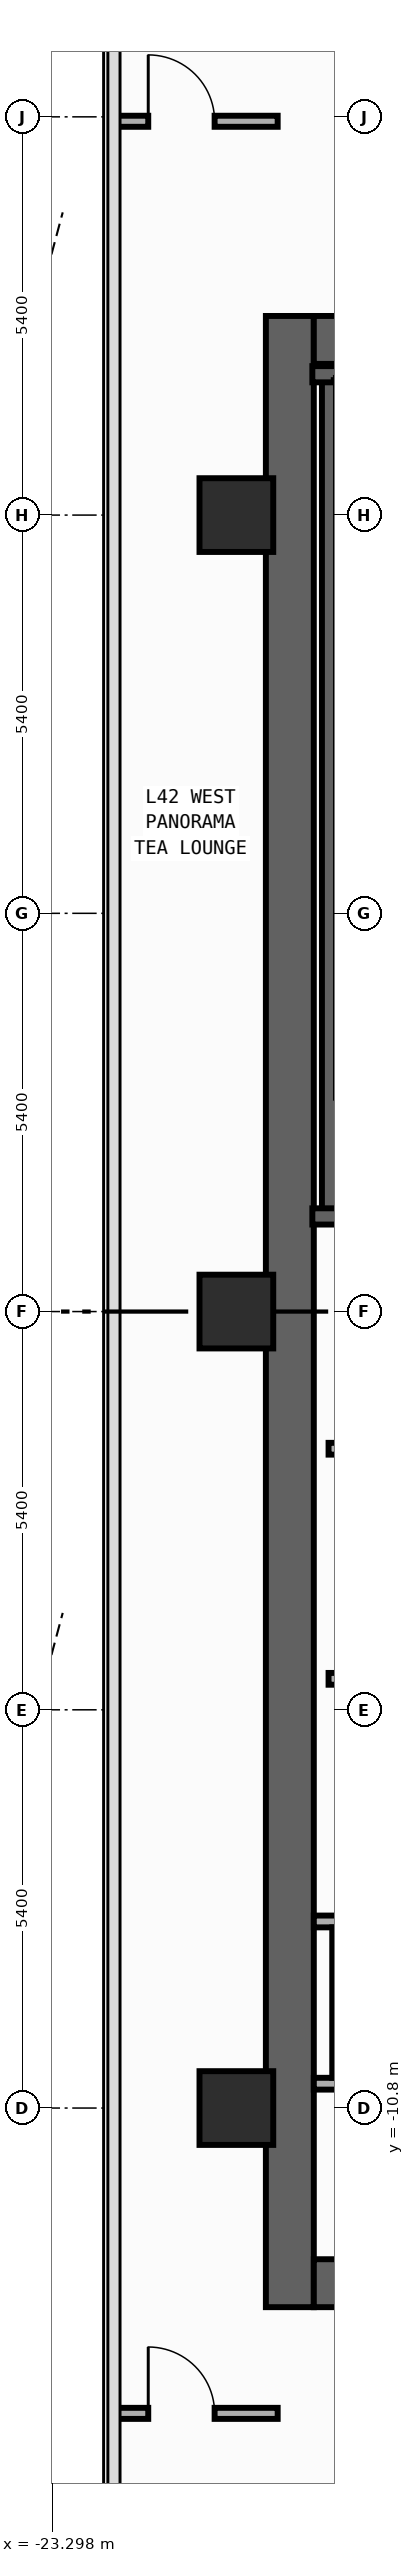
"""IFC4 building model, lengths in metres.
Left out: names, types, materials, properties, quantities, classifications, styles, units other than length and angle.
Written with IfcOpenShell. Run it as: python <this file> out.ifc"""

import sys

from ifc_helpers import new_model, si_unit, direction, frame, frame_2d, origin, origin_2d, place, context, subcontext, project, spatial, rectangle, extrude, element, fill, save


model = new_model("IFC4")
c1 = context("Model", 3, precision=1e-05, world=origin(), true_north=direction((0.0, 1.0)))
c2 = subcontext(c1, "Body", "Model", "MODEL_VIEW")
j1 = project(units=[si_unit("LENGTHUNIT", "METRE"), si_unit("PLANEANGLEUNIT", "RADIAN")], contexts=[c1])
p1 = place(None, origin())
s1 = spatial("IfcSite", under=j1, at=p1, CompositionType="ELEMENT")
p2 = place(p1, origin())
s2 = spatial("IfcBuilding", under=s1, at=p2, CompositionType="ELEMENT")
p3 = place(p2, frame((0.0, 0.0, 184.0)))
s3 = spatial("IfcBuildingStorey", under=s2, at=p3, CompositionType="ELEMENT", Elevation=184.0)
p4 = place(p3, frame((-20.075, -13.5, 0.0), z_axis=(0.0, 0.0, 1.0), x_axis=(0.0, 1.0, 0.0)))
e1 = element("IfcWall", 1, at=p4, inside=s3, PredefinedType="SHEAR", context=c2, shape_type="SweptSolid", body=[
    extrude(rectangle(XDim=27.0, YDim=0.65, at=frame_2d((13.5, 0.0))), origin(), (0.0, 0.0, 1.0), 3.54),
])
for number, where, z_axis, x_axis in (
    (2, (-19.75, -13.175, 0.0), (0.0, 0.0, 1.0), (1.0, 0.0, 0.0)),
    (3, (-19.75, 13.175, 0.0), (0.0, 0.0, 1.0), (1.0, 0.0, 0.0)),
):
    element("IfcWall", number, at=place(p3, frame(where, z_axis=z_axis, x_axis=x_axis)), inside=s3, PredefinedType="SHEAR", context=c2, shape_type="SweptSolid", body=[
        extrude(rectangle(XDim=7.1, YDim=0.65, at=frame_2d((3.55, 0.0))), origin(), (0.0, 0.0, 1.0), 3.54),
    ])
p5 = place(p3, frame((-19.53, 1.29, 0.0), z_axis=(0.0, 0.0, 1.0), x_axis=(0.0, 1.0, 0.0)))
e4 = element("IfcWall", 4, at=p5, inside=s3, PredefinedType="SHEAR", context=c2, shape_type="SweptSolid", body=[
    extrude(rectangle(XDim=11.42, YDim=0.22, at=frame_2d((5.71, 0.0))), origin(), (0.0, 0.0, 1.0), 3.54),
])
p6 = place(p3, frame((-19.77, 12.71, 0.0), z_axis=(0.0, 0.0, 1.0), x_axis=(1.0, 0.0, 0.0)))
e5 = element("IfcWall", 5, at=p6, inside=s3, PredefinedType="SHEAR", context=c2, shape_type="SweptSolid", body=[
    extrude(rectangle(XDim=4.065, YDim=0.22, at=frame_2d((2.032, 0.0))), origin(), (0.0, 0.0, 1.0), 3.54),
])
p7 = place(p3, frame((-19.77, 1.29, 0.0), z_axis=(0.0, 0.0, 1.0), x_axis=(1.0, 0.0, 0.0)))
e6 = element("IfcWall", 6, at=p7, inside=s3, PredefinedType="SHEAR", context=c2, shape_type="SweptSolid", body=[
    extrude(rectangle(XDim=4.065, YDim=0.22, at=frame_2d((2.032, 0.0))), origin(), (0.0, 0.0, 1.0), 3.54),
])
p8 = place(p7, frame((1.08, 0.0, 0.0)))
e7 = element("IfcOpeningElement", 7, at=p8, cuts=e6, PredefinedType="OPENING", context=c2, shape_type="SweptSolid", body=[
    extrude(rectangle(XDim=1.1, YDim=2.2, at=frame_2d((0.55, 1.1))), frame((0.0, 0.12, 0.0), z_axis=(0.0, -1.0, 0.0), x_axis=(1.0, 0.0, 0.0)), (0.0, 0.0, 1.0), 0.24),
])
for number, where, z_axis, x_axis in (
    (8, (-20.8, -10.8, 0.0), (0.0, 0.0, 1.0), (1.0, 0.0, 0.0)),
    (9, (-20.8, 0.0, 0.0), (0.0, 0.0, 1.0), (1.0, 0.0, 0.0)),
    (10, (-20.8, 10.8, 0.0), (0.0, 0.0, 1.0), (1.0, 0.0, 0.0)),
):
    element("IfcColumn", number, at=place(p3, frame(where, z_axis=z_axis, x_axis=x_axis)), inside=s3, PredefinedType="COLUMN", context=c2, shape_type="SweptSolid", body=[
        extrude(rectangle(XDim=1.0, YDim=1.0, at=origin_2d()), origin(), (0.0, 0.0, 1.0), 3.8),
    ])
p9 = place(p3, frame((-19.55, -1.86, 0.0), z_axis=(0.0, 0.0, 1.0), x_axis=(1.0, 0.0, 0.0)))
e11 = element("IfcWall", 11, at=p9, inside=s3, PredefinedType="STANDARD", context=c2, shape_type="SweptSolid", body=[
    extrude(rectangle(XDim=3.8, YDim=0.16, at=frame_2d((1.9, 0.0))), origin(), (0.0, 0.0, 1.0), 3.54),
])
p10 = place(p9, frame((1.18, 0.0, 0.0)))
e12 = element("IfcOpeningElement", 12, at=p10, cuts=e11, PredefinedType="OPENING", context=c2, shape_type="SweptSolid", body=[
    extrude(rectangle(XDim=1.15, YDim=2.2, at=frame_2d((0.575, 1.1))), frame((0.0, 0.09, 0.0), z_axis=(0.0, -1.0, 0.0), x_axis=(1.0, 0.0, 0.0)), (0.0, 0.0, 1.0), 0.18),
])
p11 = place(p3, frame((-19.55, -4.98, 0.0), z_axis=(0.0, 0.0, 1.0), x_axis=(1.0, 0.0, 0.0)))
e13 = element("IfcWall", 13, at=p11, inside=s3, PredefinedType="STANDARD", context=c2, shape_type="SweptSolid", body=[
    extrude(rectangle(XDim=3.8, YDim=0.16, at=frame_2d((1.9, 0.0))), origin(), (0.0, 0.0, 1.0), 3.54),
])
for number, where, z_axis, x_axis in (
    (14, (-19.75, -10.47, 0.0), (0.0, 0.0, 1.0), (1.0, 0.0, 0.0)),
    (15, (-19.75, -8.27, 0.0), (0.0, 0.0, 1.0), (1.0, 0.0, 0.0)),
):
    element("IfcWall", number, at=place(p3, frame(where, z_axis=z_axis, x_axis=x_axis)), inside=s3, PredefinedType="PARTITIONING", context=c2, shape_type="SweptSolid", body=[
        extrude(rectangle(XDim=2.44, YDim=0.16, at=frame_2d((1.22, 0.0))), origin(), (0.0, 0.0, 1.0), 3.54),
    ])
p12 = place(p3, frame((-22.455, 16.14, 0.0), z_axis=(0.0, 0.0, 1.0), x_axis=(1.0, 0.0, 0.0)))
e16 = element("IfcWall", 16, at=p12, inside=s3, PredefinedType="PARTITIONING", context=c2, shape_type="SweptSolid", body=[
    extrude(rectangle(XDim=2.215, YDim=0.15, at=frame_2d((1.107, 0.0))), origin(), (0.0, 0.0, 1.0), 3.54),
])
p13 = place(p12, frame((0.46, 0.0, 0.0)))
e17 = element("IfcOpeningElement", 17, at=p13, cuts=e16, PredefinedType="OPENING", context=c2, shape_type="SweptSolid", body=[
    extrude(rectangle(XDim=0.9, YDim=2.15, at=frame_2d((0.45, 1.075))), frame((0.0, 0.085, 0.0), z_axis=(0.0, -1.0, 0.0), x_axis=(1.0, 0.0, 0.0)), (0.0, 0.0, 1.0), 0.17),
])
p14 = place(p3, frame((-22.455, -14.94, 0.0), z_axis=(0.0, 0.0, 1.0), x_axis=(1.0, 0.0, 0.0)))
e18 = element("IfcWall", 18, at=p14, inside=s3, PredefinedType="PARTITIONING", context=c2, shape_type="SweptSolid", body=[
    extrude(rectangle(XDim=2.215, YDim=0.15, at=frame_2d((1.107, 0.0))), origin(), (0.0, 0.0, 1.0), 3.54),
])
p15 = place(p14, frame((0.46, 0.0, 0.0)))
e19 = element("IfcOpeningElement", 19, at=p15, cuts=e18, PredefinedType="OPENING", context=c2, shape_type="SweptSolid", body=[
    extrude(rectangle(XDim=0.9, YDim=2.15, at=frame_2d((0.45, 1.075))), frame((0.0, 0.085, 0.0), z_axis=(0.0, -1.0, 0.0), x_axis=(1.0, 0.0, 0.0)), (0.0, 0.0, 1.0), 0.17),
])
p16 = place(p3, frame((-19.45, -10.39, 0.0), z_axis=(0.0, 0.0, 1.0), x_axis=(0.0, 1.0, 0.0)))
e20 = element("IfcWall", 20, at=p16, inside=s3, PredefinedType="PARTITIONING", context=c2, shape_type="SweptSolid", body=[
    extrude(rectangle(XDim=2.04, YDim=0.1, at=frame_2d((1.02, 0.0))), origin(), (0.0, 0.0, 1.0), 3.54),
])
p17 = place(p13, origin())
e21 = element("IfcDoor", 21, at=p17, inside=s3, OperationType="SINGLE_SWING_LEFT", PredefinedType="DOOR", context=c2, shape_type="SweptSolid", body=[
    extrude(rectangle(XDim=0.9, YDim=2.15, at=frame_2d((0.45, 1.075))), frame((0.0, 0.025, 0.0), z_axis=(0.0, -1.0, 0.0), x_axis=(1.0, 0.0, 0.0)), (0.0, 0.0, 1.0), 0.05),
])
fill(e17, e21)
p18 = place(p15, origin())
e22 = element("IfcDoor", 22, at=p18, inside=s3, OperationType="SINGLE_SWING_LEFT", PredefinedType="DOOR", context=c2, shape_type="SweptSolid", body=[
    extrude(rectangle(XDim=0.9, YDim=2.15, at=frame_2d((0.45, 1.075))), frame((0.0, 0.025, 0.0), z_axis=(0.0, -1.0, 0.0), x_axis=(1.0, 0.0, 0.0)), (0.0, 0.0, 1.0), 0.05),
])
fill(e19, e22)
save(model, sys.argv[1])
